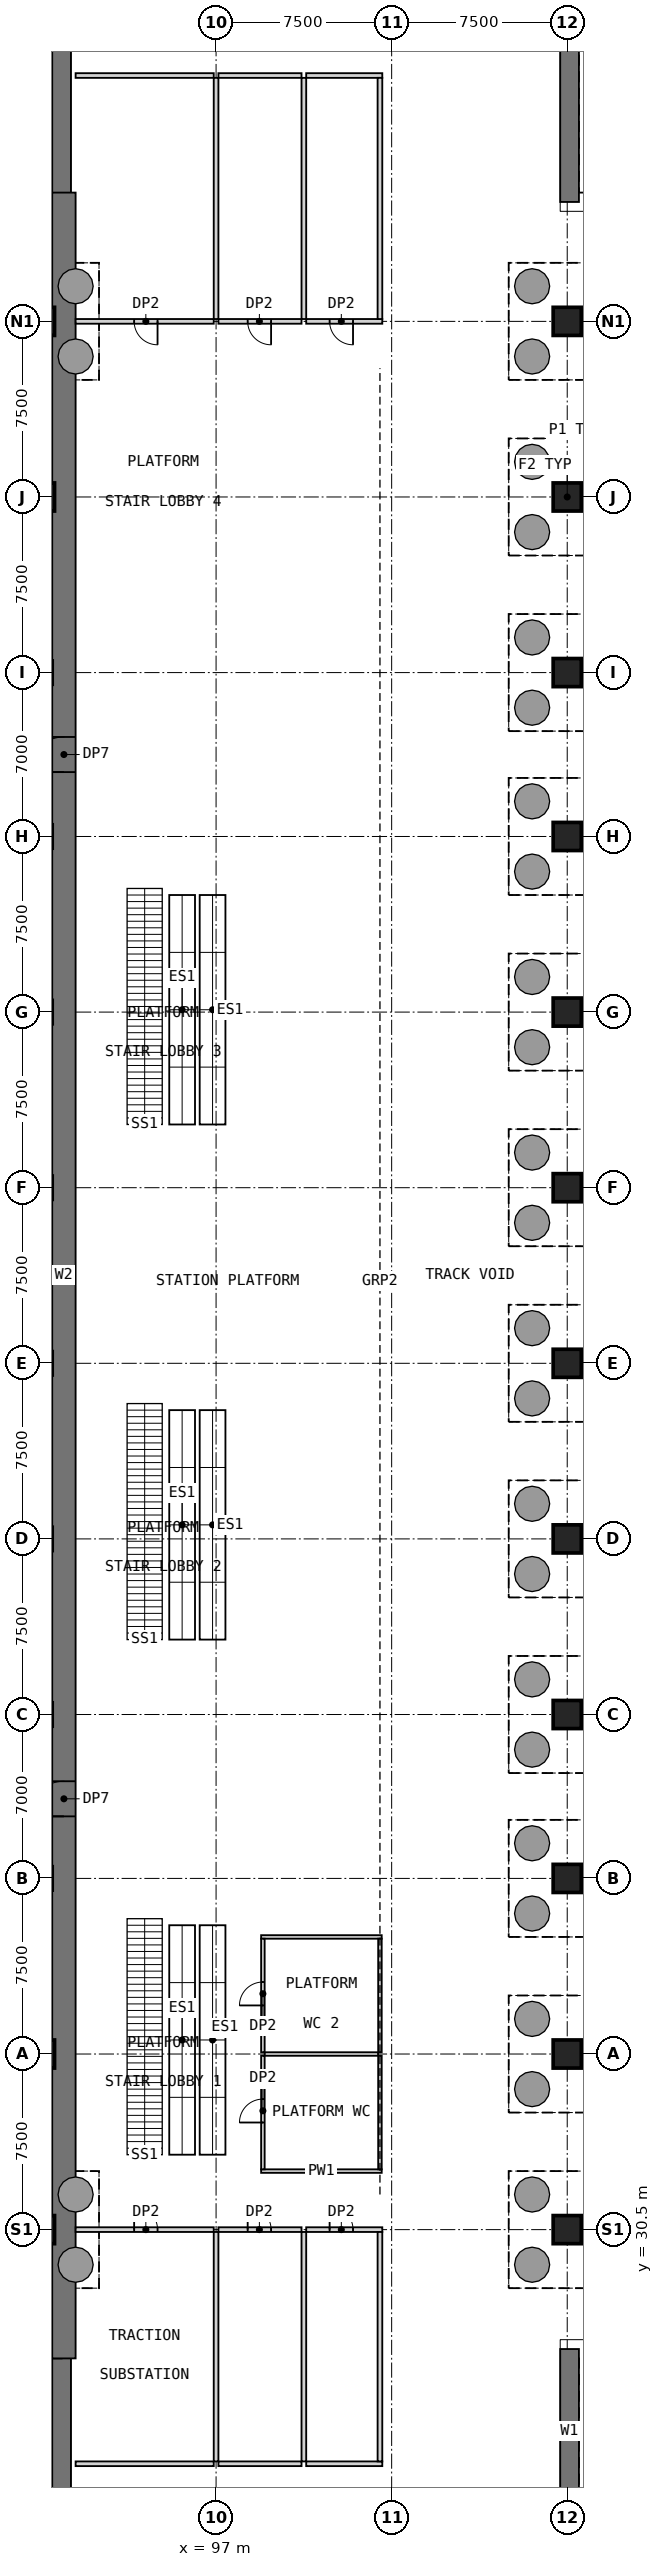
"""IFC4 building model, lengths in metres.
Left out: names, types, materials, properties, quantities, classifications, styles, units other than length and angle.
Written with IfcOpenShell. Run it as: python <this file> out.ifc"""

import sys

from ifc_helpers import new_model, si_unit, direction, frame, frame_2d, origin, origin_2d, place, context, subcontext, project, spatial, rectangle, extrude, element, fill, save


model = new_model("IFC4")
c1 = context("Model", 3, precision=1e-05, world=origin(), true_north=direction((0.0, 1.0)))
c2 = subcontext(c1, "Body", "Model", "MODEL_VIEW")
j1 = project(units=[si_unit("LENGTHUNIT", "METRE"), si_unit("PLANEANGLEUNIT", "RADIAN")], contexts=[c1])
p1 = place(None, origin())
s1 = spatial("IfcSite", under=j1, at=p1, CompositionType="ELEMENT")
p2 = place(p1, origin())
s2 = spatial("IfcBuilding", under=s1, at=p2, CompositionType="ELEMENT")
p3 = place(p2, frame((0.0, 0.0, -12.0)))
s3 = spatial("IfcBuildingStorey", under=s2, at=p3, CompositionType="ELEMENT", Elevation=-12.0)
p4 = place(p3, frame((117.1, 25.4, -0.6), z_axis=(0.0, 0.0, 1.0), x_axis=(-1.0, 0.0, 0.0)))
e1 = element("IfcWall", 1, at=p4, inside=s3, PredefinedType="SHEAR", context=c2, shape_type="SweptSolid", body=[
    extrude(rectangle(XDim=5.0, YDim=0.8, at=frame_2d((2.5, 0.0))), origin(), (0.0, 0.0, 1.0), 6.6),
])
for number, where, z_axis, x_axis in (
    (2, (112.1, 25.4, -0.6), (0.0, 0.0, 1.0), (0.0, -1.0, 0.0)),
    (3, (90.4, 18.4, -0.6), (0.0, 0.0, 1.0), (0.0, 1.0, 0.0)),
):
    element("IfcWall", number, at=place(p3, frame(where, z_axis=z_axis, x_axis=x_axis)), inside=s3, PredefinedType="SHEAR", context=c2, shape_type="SweptSolid", body=[
        extrude(rectangle(XDim=7.0, YDim=0.8, at=frame_2d((3.5, 0.0))), origin(), (0.0, 0.0, 1.0), 6.6),
    ])
for number, where, z_axis, x_axis in (
    (4, (90.4, 25.4, -0.6), (0.0, 0.0, 1.0), (-1.0, 0.0, 0.0)),
    (5, (10.4, 117.1, -0.6), (0.0, 0.0, 1.0), (1.0, 0.0, 0.0)),
):
    element("IfcWall", number, at=place(p3, frame(where, z_axis=z_axis, x_axis=x_axis)), inside=s3, PredefinedType="SHEAR", context=c2, shape_type="SweptSolid", body=[
        extrude(rectangle(XDim=80.0, YDim=0.8, at=frame_2d((40.0, 0.0))), origin(), (0.0, 0.0, 1.0), 6.6),
    ])
for number, where, z_axis, x_axis in (
    (6, (90.4, 117.1, -0.6), (0.0, 0.0, 1.0), (0.0, 1.0, 0.0)),
    (7, (112.1, 124.1, -0.6), (0.0, 0.0, 1.0), (0.0, -1.0, 0.0)),
):
    element("IfcWall", number, at=place(p3, frame(where, z_axis=z_axis, x_axis=x_axis)), inside=s3, PredefinedType="SHEAR", context=c2, shape_type="SweptSolid", body=[
        extrude(rectangle(XDim=7.0, YDim=0.8, at=frame_2d((3.5, 0.0))), origin(), (0.0, 0.0, 1.0), 6.6),
    ])
p5 = place(p3, frame((112.1, 117.1, -0.6), z_axis=(0.0, 0.0, 1.0), x_axis=(1.0, 0.0, 0.0)))
e8 = element("IfcWall", 8, at=p5, inside=s3, PredefinedType="SHEAR", context=c2, shape_type="SweptSolid", body=[
    extrude(rectangle(XDim=5.0, YDim=0.8, at=frame_2d((2.5, 0.0))), origin(), (0.0, 0.0, 1.0), 6.6),
])
p6 = place(p3, frame((90.5, 25.0, 0.0), z_axis=(0.0, 0.0, 1.0), x_axis=(0.0, 1.0, 0.0)))
e9 = element("IfcWall", 9, at=p6, inside=s3, PredefinedType="SHEAR", context=c2, shape_type="SweptSolid", body=[
    extrude(rectangle(XDim=92.5, YDim=1.0, at=frame_2d((46.25, 0.0))), origin(), (0.0, 0.0, 1.0), 5.4),
])
p7 = place(p6, frame((23.15, 0.0, 0.0)))
e10 = element("IfcOpeningElement", 10, at=p7, cuts=e9, PredefinedType="OPENING", context=c2, shape_type="SweptSolid", body=[
    extrude(rectangle(XDim=1.5, YDim=2.1, at=frame_2d((0.75, 1.05))), frame((0.0, 0.51, 0.0), z_axis=(0.0, -1.0, 0.0), x_axis=(1.0, 0.0, 0.0)), (0.0, 0.0, 1.0), 1.02),
])
p8 = place(p6, frame((67.75, 0.0, 0.0)))
e11 = element("IfcOpeningElement", 11, at=p8, cuts=e9, PredefinedType="OPENING", context=c2, shape_type="SweptSolid", body=[
    extrude(rectangle(XDim=1.5, YDim=2.1, at=frame_2d((0.75, 1.05))), frame((0.0, 0.51, 0.0), z_axis=(0.0, -1.0, 0.0), x_axis=(1.0, 0.0, 0.0)), (0.0, 0.0, 1.0), 1.02),
])
for number, where, z_axis, x_axis in (
    (12, (89.5, 30.5, 0.0), (0.0, 0.0, 1.0), (1.0, 0.0, 0.0)),
    (13, (89.5, 38.0, 0.0), (0.0, 0.0, 1.0), (1.0, 0.0, 0.0)),
    (14, (89.5, 104.5, 0.0), (0.0, 0.0, 1.0), (1.0, 0.0, 0.0)),
    (15, (89.5, 112.0, 0.0), (0.0, 0.0, 1.0), (1.0, 0.0, 0.0)),
    (16, (112.0, 30.5, 0.0), (0.0, 0.0, 1.0), (1.0, 0.0, 0.0)),
    (17, (112.0, 38.0, 0.0), (0.0, 0.0, 1.0), (1.0, 0.0, 0.0)),
    (18, (112.0, 45.5, 0.0), (0.0, 0.0, 1.0), (1.0, 0.0, 0.0)),
    (19, (112.0, 52.5, 0.0), (0.0, 0.0, 1.0), (1.0, 0.0, 0.0)),
    (20, (112.0, 60.0, 0.0), (0.0, 0.0, 1.0), (1.0, 0.0, 0.0)),
    (21, (112.0, 67.5, 0.0), (0.0, 0.0, 1.0), (1.0, 0.0, 0.0)),
    (22, (112.0, 75.0, 0.0), (0.0, 0.0, 1.0), (1.0, 0.0, 0.0)),
    (23, (112.0, 82.5, 0.0), (0.0, 0.0, 1.0), (1.0, 0.0, 0.0)),
    (24, (112.0, 90.0, 0.0), (0.0, 0.0, 1.0), (1.0, 0.0, 0.0)),
    (25, (112.0, 97.0, 0.0), (0.0, 0.0, 1.0), (1.0, 0.0, 0.0)),
    (26, (112.0, 104.5, 0.0), (0.0, 0.0, 1.0), (1.0, 0.0, 0.0)),
    (27, (112.0, 112.0, 0.0), (0.0, 0.0, 1.0), (1.0, 0.0, 0.0)),
):
    element("IfcColumn", number, at=place(p3, frame(where, z_axis=z_axis, x_axis=x_axis)), inside=s3, PredefinedType="COLUMN", context=c2, shape_type="SweptSolid", body=[
        extrude(rectangle(XDim=1.2, YDim=1.2, at=origin_2d()), origin(), (0.0, 0.0, 1.0), 6.0),
    ])
p9 = place(p3, frame((96.9, 112.0, 0.0), z_axis=(0.0, 0.0, 1.0), x_axis=(-1.0, 0.0, 0.0)))
e28 = element("IfcWall", 28, at=p9, inside=s3, PredefinedType="PARTITIONING", context=c2, shape_type="SweptSolid", body=[
    extrude(rectangle(XDim=5.9, YDim=0.2, at=frame_2d((2.95, 0.0))), origin(), (0.0, 0.0, 1.0), 5.4),
])
p10 = place(p9, frame((2.4, 0.0, 0.0)))
e29 = element("IfcOpeningElement", 29, at=p10, cuts=e28, PredefinedType="OPENING", context=c2, shape_type="SweptSolid", body=[
    extrude(rectangle(XDim=1.0, YDim=2.1, at=frame_2d((0.5, 1.05))), frame((0.0, 0.11, 0.0), z_axis=(0.0, -1.0, 0.0), x_axis=(1.0, 0.0, 0.0)), (0.0, 0.0, 1.0), 0.22),
])
p11 = place(p3, frame((100.65, 112.0, 0.0), z_axis=(0.0, 0.0, 1.0), x_axis=(-1.0, 0.0, 0.0)))
e30 = element("IfcWall", 30, at=p11, inside=s3, PredefinedType="PARTITIONING", context=c2, shape_type="SweptSolid", body=[
    extrude(rectangle(XDim=3.55, YDim=0.2, at=frame_2d((1.775, 0.0))), origin(), (0.0, 0.0, 1.0), 5.4),
])
p12 = place(p11, frame((1.3, 0.0, 0.0)))
e31 = element("IfcOpeningElement", 31, at=p12, cuts=e30, PredefinedType="OPENING", context=c2, shape_type="SweptSolid", body=[
    extrude(rectangle(XDim=1.0, YDim=2.1, at=frame_2d((0.5, 1.05))), frame((0.0, 0.11, 0.0), z_axis=(0.0, -1.0, 0.0), x_axis=(1.0, 0.0, 0.0)), (0.0, 0.0, 1.0), 0.22),
])
p13 = place(p3, frame((104.1, 112.0, 0.0), z_axis=(0.0, 0.0, 1.0), x_axis=(-1.0, 0.0, 0.0)))
e32 = element("IfcWall", 32, at=p13, inside=s3, PredefinedType="PARTITIONING", context=c2, shape_type="SweptSolid", body=[
    extrude(rectangle(XDim=3.25, YDim=0.2, at=frame_2d((1.625, 0.0))), origin(), (0.0, 0.0, 1.0), 5.4),
])
p14 = place(p13, frame((1.25, 0.0, 0.0)))
e33 = element("IfcOpeningElement", 33, at=p14, cuts=e32, PredefinedType="OPENING", context=c2, shape_type="SweptSolid", body=[
    extrude(rectangle(XDim=1.0, YDim=2.1, at=frame_2d((0.5, 1.05))), frame((0.0, 0.11, 0.0), z_axis=(0.0, -1.0, 0.0), x_axis=(1.0, 0.0, 0.0)), (0.0, 0.0, 1.0), 0.22),
])
p15 = place(p3, frame((91.0, 30.5, 0.0), z_axis=(0.0, 0.0, 1.0), x_axis=(1.0, 0.0, 0.0)))
e34 = element("IfcWall", 34, at=p15, inside=s3, PredefinedType="PARTITIONING", context=c2, shape_type="SweptSolid", body=[
    extrude(rectangle(XDim=5.9, YDim=0.2, at=frame_2d((2.95, 0.0))), origin(), (0.0, 0.0, 1.0), 5.4),
])
p16 = place(p15, frame((2.5, 0.0, 0.0)))
e35 = element("IfcOpeningElement", 35, at=p16, cuts=e34, PredefinedType="OPENING", context=c2, shape_type="SweptSolid", body=[
    extrude(rectangle(XDim=1.0, YDim=2.1, at=frame_2d((0.5, 1.05))), frame((0.0, 0.11, 0.0), z_axis=(0.0, -1.0, 0.0), x_axis=(1.0, 0.0, 0.0)), (0.0, 0.0, 1.0), 0.22),
])
p17 = place(p3, frame((97.1, 30.5, 0.0), z_axis=(0.0, 0.0, 1.0), x_axis=(1.0, 0.0, 0.0)))
e36 = element("IfcWall", 36, at=p17, inside=s3, PredefinedType="PARTITIONING", context=c2, shape_type="SweptSolid", body=[
    extrude(rectangle(XDim=3.55, YDim=0.2, at=frame_2d((1.775, 0.0))), origin(), (0.0, 0.0, 1.0), 5.4),
])
p18 = place(p17, frame((1.25, 0.0, 0.0)))
e37 = element("IfcOpeningElement", 37, at=p18, cuts=e36, PredefinedType="OPENING", context=c2, shape_type="SweptSolid", body=[
    extrude(rectangle(XDim=1.0, YDim=2.1, at=frame_2d((0.5, 1.05))), frame((0.0, 0.11, 0.0), z_axis=(0.0, -1.0, 0.0), x_axis=(1.0, 0.0, 0.0)), (0.0, 0.0, 1.0), 0.22),
])
p19 = place(p3, frame((100.85, 30.5, 0.0), z_axis=(0.0, 0.0, 1.0), x_axis=(1.0, 0.0, 0.0)))
e38 = element("IfcWall", 38, at=p19, inside=s3, PredefinedType="PARTITIONING", context=c2, shape_type="SweptSolid", body=[
    extrude(rectangle(XDim=3.25, YDim=0.2, at=frame_2d((1.625, 0.0))), origin(), (0.0, 0.0, 1.0), 5.4),
])
p20 = place(p19, frame((1.0, 0.0, 0.0)))
e39 = element("IfcOpeningElement", 39, at=p20, cuts=e38, PredefinedType="OPENING", context=c2, shape_type="SweptSolid", body=[
    extrude(rectangle(XDim=1.0, YDim=2.1, at=frame_2d((0.5, 1.05))), frame((0.0, 0.11, 0.0), z_axis=(0.0, -1.0, 0.0), x_axis=(1.0, 0.0, 0.0)), (0.0, 0.0, 1.0), 0.22),
])
p21 = place(p3, frame((98.925, 33.0, 0.0), z_axis=(0.0, 0.0, 1.0), x_axis=(1.0, 0.0, 0.0)))
e40 = element("IfcWall", 40, at=p21, inside=s3, PredefinedType="PARTITIONING", context=c2, shape_type="SweptSolid", body=[
    extrude(rectangle(XDim=5.15, YDim=0.15, at=frame_2d((2.575, 0.0))), origin(), (0.0, 0.0, 1.0), 5.4),
])
p22 = place(p3, frame((99.075, 38.0, 0.0), z_axis=(0.0, 0.0, 1.0), x_axis=(1.0, 0.0, 0.0)))
e41 = element("IfcWall", 41, at=p22, inside=s3, PredefinedType="PARTITIONING", context=c2, shape_type="SweptSolid", body=[
    extrude(rectangle(XDim=4.85, YDim=0.15, at=frame_2d((2.425, 0.0))), origin(), (0.0, 0.0, 1.0), 5.4),
])
p23 = place(p3, frame((98.925, 43.0, 0.0), z_axis=(0.0, 0.0, 1.0), x_axis=(1.0, 0.0, 0.0)))
e42 = element("IfcWall", 42, at=p23, inside=s3, PredefinedType="PARTITIONING", context=c2, shape_type="SweptSolid", body=[
    extrude(rectangle(XDim=5.15, YDim=0.15, at=frame_2d((2.575, 0.0))), origin(), (0.0, 0.0, 1.0), 5.4),
])
p24 = place(p3, frame((91.0, 20.5, 0.0), z_axis=(0.0, 0.0, 1.0), x_axis=(1.0, 0.0, 0.0)))
e43 = element("IfcWall", 43, at=p24, inside=s3, PredefinedType="PARTITIONING", context=c2, shape_type="SweptSolid", body=[
    extrude(rectangle(XDim=5.9, YDim=0.2, at=frame_2d((2.95, 0.0))), origin(), (0.0, 0.0, 1.0), 5.4),
])
p25 = place(p3, frame((97.1, 20.5, 0.0), z_axis=(0.0, 0.0, 1.0), x_axis=(1.0, 0.0, 0.0)))
e44 = element("IfcWall", 44, at=p25, inside=s3, PredefinedType="PARTITIONING", context=c2, shape_type="SweptSolid", body=[
    extrude(rectangle(XDim=3.55, YDim=0.2, at=frame_2d((1.775, 0.0))), origin(), (0.0, 0.0, 1.0), 5.4),
])
p26 = place(p3, frame((100.85, 20.5, 0.0), z_axis=(0.0, 0.0, 1.0), x_axis=(1.0, 0.0, 0.0)))
e45 = element("IfcWall", 45, at=p26, inside=s3, PredefinedType="PARTITIONING", context=c2, shape_type="SweptSolid", body=[
    extrude(rectangle(XDim=3.25, YDim=0.2, at=frame_2d((1.625, 0.0))), origin(), (0.0, 0.0, 1.0), 5.4),
])
p27 = place(p3, frame((91.0, 122.5, 0.0), z_axis=(0.0, 0.0, 1.0), x_axis=(1.0, 0.0, 0.0)))
e46 = element("IfcWall", 46, at=p27, inside=s3, PredefinedType="PARTITIONING", context=c2, shape_type="SweptSolid", body=[
    extrude(rectangle(XDim=5.9, YDim=0.2, at=frame_2d((2.95, 0.0))), origin(), (0.0, 0.0, 1.0), 5.4),
])
p28 = place(p3, frame((97.1, 122.5, 0.0), z_axis=(0.0, 0.0, 1.0), x_axis=(1.0, 0.0, 0.0)))
e47 = element("IfcWall", 47, at=p28, inside=s3, PredefinedType="PARTITIONING", context=c2, shape_type="SweptSolid", body=[
    extrude(rectangle(XDim=3.55, YDim=0.2, at=frame_2d((1.775, 0.0))), origin(), (0.0, 0.0, 1.0), 5.4),
])
p29 = place(p3, frame((100.85, 122.5, 0.0), z_axis=(0.0, 0.0, 1.0), x_axis=(1.0, 0.0, 0.0)))
e48 = element("IfcWall", 48, at=p29, inside=s3, PredefinedType="PARTITIONING", context=c2, shape_type="SweptSolid", body=[
    extrude(rectangle(XDim=3.25, YDim=0.2, at=frame_2d((1.625, 0.0))), origin(), (0.0, 0.0, 1.0), 5.4),
])
p30 = place(p3, frame((99.0, 33.075, 0.0), z_axis=(0.0, 0.0, 1.0), x_axis=(0.0, 1.0, 0.0)))
e49 = element("IfcWall", 49, at=p30, inside=s3, PredefinedType="PARTITIONING", context=c2, shape_type="SweptSolid", body=[
    extrude(rectangle(XDim=4.85, YDim=0.15, at=frame_2d((2.425, 0.0))), origin(), (0.0, 0.0, 1.0), 5.4),
])
p31 = place(p30, frame((2.0, 0.0, 0.0)))
e50 = element("IfcOpeningElement", 50, at=p31, cuts=e49, PredefinedType="OPENING", context=c2, shape_type="SweptSolid", body=[
    extrude(rectangle(XDim=1.0, YDim=2.1, at=frame_2d((0.5, 1.05))), frame((0.0, 0.085, 0.0), z_axis=(0.0, -1.0, 0.0), x_axis=(1.0, 0.0, 0.0)), (0.0, 0.0, 1.0), 0.17),
])
p32 = place(p3, frame((99.0, 38.075, 0.0), z_axis=(0.0, 0.0, 1.0), x_axis=(0.0, 1.0, 0.0)))
e51 = element("IfcWall", 51, at=p32, inside=s3, PredefinedType="PARTITIONING", context=c2, shape_type="SweptSolid", body=[
    extrude(rectangle(XDim=4.85, YDim=0.15, at=frame_2d((2.425, 0.0))), origin(), (0.0, 0.0, 1.0), 5.4),
])
p33 = place(p32, frame((2.0, 0.0, 0.0)))
e52 = element("IfcOpeningElement", 52, at=p33, cuts=e51, PredefinedType="OPENING", context=c2, shape_type="SweptSolid", body=[
    extrude(rectangle(XDim=1.0, YDim=2.1, at=frame_2d((0.5, 1.05))), frame((0.0, 0.085, 0.0), z_axis=(0.0, -1.0, 0.0), x_axis=(1.0, 0.0, 0.0)), (0.0, 0.0, 1.0), 0.17),
])
p34 = place(p3, frame((104.0, 20.6, 0.0), z_axis=(0.0, 0.0, 1.0), x_axis=(0.0, 1.0, 0.0)))
e53 = element("IfcWall", 53, at=p34, inside=s3, PredefinedType="PARTITIONING", context=c2, shape_type="SweptSolid", body=[
    extrude(rectangle(XDim=9.8, YDim=0.2, at=frame_2d((4.9, 0.0))), origin(), (0.0, 0.0, 1.0), 5.4),
])
for number, where, z_axis, x_axis in (
    (54, (104.0, 33.075, 0.0), (0.0, 0.0, 1.0), (0.0, 1.0, 0.0)),
    (55, (104.0, 38.075, 0.0), (0.0, 0.0, 1.0), (0.0, 1.0, 0.0)),
):
    element("IfcWall", number, at=place(p3, frame(where, z_axis=z_axis, x_axis=x_axis)), inside=s3, PredefinedType="PARTITIONING", context=c2, shape_type="SweptSolid", body=[
        extrude(rectangle(XDim=4.85, YDim=0.15, at=frame_2d((2.425, 0.0))), origin(), (0.0, 0.0, 1.0), 5.4),
    ])
p35 = place(p3, frame((104.0, 112.1, 0.0), z_axis=(0.0, 0.0, 1.0), x_axis=(0.0, 1.0, 0.0)))
e56 = element("IfcWall", 56, at=p35, inside=s3, PredefinedType="PARTITIONING", context=c2, shape_type="SweptSolid", body=[
    extrude(rectangle(XDim=10.3, YDim=0.2, at=frame_2d((5.15, 0.0))), origin(), (0.0, 0.0, 1.0), 5.4),
])
p36 = place(p3, frame((97.0, 20.6, 0.0), z_axis=(0.0, 0.0, 1.0), x_axis=(0.0, 1.0, 0.0)))
e57 = element("IfcWall", 57, at=p36, inside=s3, PredefinedType="PARTITIONING", context=c2, shape_type="SweptSolid", body=[
    extrude(rectangle(XDim=9.8, YDim=0.2, at=frame_2d((4.9, 0.0))), origin(), (0.0, 0.0, 1.0), 5.4),
])
p37 = place(p3, frame((97.0, 112.1, 0.0), z_axis=(0.0, 0.0, 1.0), x_axis=(0.0, 1.0, 0.0)))
e58 = element("IfcWall", 58, at=p37, inside=s3, PredefinedType="PARTITIONING", context=c2, shape_type="SweptSolid", body=[
    extrude(rectangle(XDim=10.3, YDim=0.2, at=frame_2d((5.15, 0.0))), origin(), (0.0, 0.0, 1.0), 5.4),
])
p38 = place(p3, frame((100.75, 20.6, 0.0), z_axis=(0.0, 0.0, 1.0), x_axis=(0.0, 1.0, 0.0)))
e59 = element("IfcWall", 59, at=p38, inside=s3, PredefinedType="PARTITIONING", context=c2, shape_type="SweptSolid", body=[
    extrude(rectangle(XDim=9.8, YDim=0.2, at=frame_2d((4.9, 0.0))), origin(), (0.0, 0.0, 1.0), 5.4),
])
p39 = place(p3, frame((100.75, 112.1, 0.0), z_axis=(0.0, 0.0, 1.0), x_axis=(0.0, 1.0, 0.0)))
e60 = element("IfcWall", 60, at=p39, inside=s3, PredefinedType="PARTITIONING", context=c2, shape_type="SweptSolid", body=[
    extrude(rectangle(XDim=10.3, YDim=0.2, at=frame_2d((5.15, 0.0))), origin(), (0.0, 0.0, 1.0), 5.4),
])
p40 = place(p10, origin())
e61 = element("IfcDoor", 61, at=p40, inside=s3, OperationType="SINGLE_SWING_LEFT", PredefinedType="DOOR", context=c2, shape_type="SweptSolid", body=[
    extrude(rectangle(XDim=1.0, YDim=2.1, at=frame_2d((0.5, 1.05))), frame((0.0, 0.025, 0.0), z_axis=(0.0, -1.0, 0.0), x_axis=(1.0, 0.0, 0.0)), (0.0, 0.0, 1.0), 0.05),
])
fill(e29, e61)
p41 = place(p12, origin())
e62 = element("IfcDoor", 62, at=p41, inside=s3, OperationType="SINGLE_SWING_LEFT", PredefinedType="DOOR", context=c2, shape_type="SweptSolid", body=[
    extrude(rectangle(XDim=1.0, YDim=2.1, at=frame_2d((0.5, 1.05))), frame((0.0, 0.025, 0.0), z_axis=(0.0, -1.0, 0.0), x_axis=(1.0, 0.0, 0.0)), (0.0, 0.0, 1.0), 0.05),
])
fill(e31, e62)
p42 = place(p14, origin())
e63 = element("IfcDoor", 63, at=p42, inside=s3, OperationType="SINGLE_SWING_LEFT", PredefinedType="DOOR", context=c2, shape_type="SweptSolid", body=[
    extrude(rectangle(XDim=1.0, YDim=2.1, at=frame_2d((0.5, 1.05))), frame((0.0, 0.025, 0.0), z_axis=(0.0, -1.0, 0.0), x_axis=(1.0, 0.0, 0.0)), (0.0, 0.0, 1.0), 0.05),
])
fill(e33, e63)
p43 = place(p16, origin())
e64 = element("IfcDoor", 64, at=p43, inside=s3, OperationType="SINGLE_SWING_LEFT", PredefinedType="DOOR", context=c2, shape_type="SweptSolid", body=[
    extrude(rectangle(XDim=1.0, YDim=2.1, at=frame_2d((0.5, 1.05))), frame((0.0, 0.025, 0.0), z_axis=(0.0, -1.0, 0.0), x_axis=(1.0, 0.0, 0.0)), (0.0, 0.0, 1.0), 0.05),
])
fill(e35, e64)
p44 = place(p18, origin())
e65 = element("IfcDoor", 65, at=p44, inside=s3, OperationType="SINGLE_SWING_LEFT", PredefinedType="DOOR", context=c2, shape_type="SweptSolid", body=[
    extrude(rectangle(XDim=1.0, YDim=2.1, at=frame_2d((0.5, 1.05))), frame((0.0, 0.025, 0.0), z_axis=(0.0, -1.0, 0.0), x_axis=(1.0, 0.0, 0.0)), (0.0, 0.0, 1.0), 0.05),
])
fill(e37, e65)
p45 = place(p20, origin())
e66 = element("IfcDoor", 66, at=p45, inside=s3, OperationType="SINGLE_SWING_LEFT", PredefinedType="DOOR", context=c2, shape_type="SweptSolid", body=[
    extrude(rectangle(XDim=1.0, YDim=2.1, at=frame_2d((0.5, 1.05))), frame((0.0, 0.025, 0.0), z_axis=(0.0, -1.0, 0.0), x_axis=(1.0, 0.0, 0.0)), (0.0, 0.0, 1.0), 0.05),
])
fill(e39, e66)
p46 = place(p31, origin())
e67 = element("IfcDoor", 67, at=p46, inside=s3, OperationType="SINGLE_SWING_LEFT", PredefinedType="DOOR", context=c2, shape_type="SweptSolid", body=[
    extrude(rectangle(XDim=1.0, YDim=2.1, at=frame_2d((0.5, 1.05))), frame((0.0, 0.025, 0.0), z_axis=(0.0, -1.0, 0.0), x_axis=(1.0, 0.0, 0.0)), (0.0, 0.0, 1.0), 0.05),
])
fill(e50, e67)
p47 = place(p33, origin())
e68 = element("IfcDoor", 68, at=p47, inside=s3, OperationType="SINGLE_SWING_LEFT", PredefinedType="DOOR", context=c2, shape_type="SweptSolid", body=[
    extrude(rectangle(XDim=1.0, YDim=2.1, at=frame_2d((0.5, 1.05))), frame((0.0, 0.025, 0.0), z_axis=(0.0, -1.0, 0.0), x_axis=(1.0, 0.0, 0.0)), (0.0, 0.0, 1.0), 0.05),
])
fill(e52, e68)
p48 = place(p7, origin())
e69 = element("IfcDoor", 69, at=p48, inside=s3, OperationType="SINGLE_SWING_LEFT", PredefinedType="DOOR", context=c2, shape_type="SweptSolid", body=[
    extrude(rectangle(XDim=1.5, YDim=2.1, at=frame_2d((0.75, 1.05))), frame((0.0, 0.025, 0.0), z_axis=(0.0, -1.0, 0.0), x_axis=(1.0, 0.0, 0.0)), (0.0, 0.0, 1.0), 0.05),
])
fill(e10, e69)
p49 = place(p8, origin())
e70 = element("IfcDoor", 70, at=p49, inside=s3, OperationType="SINGLE_SWING_LEFT", PredefinedType="DOOR", context=c2, shape_type="SweptSolid", body=[
    extrude(rectangle(XDim=1.5, YDim=2.1, at=frame_2d((0.75, 1.05))), frame((0.0, 0.025, 0.0), z_axis=(0.0, -1.0, 0.0), x_axis=(1.0, 0.0, 0.0)), (0.0, 0.0, 1.0), 0.05),
])
fill(e11, e70)
save(model, sys.argv[1])
